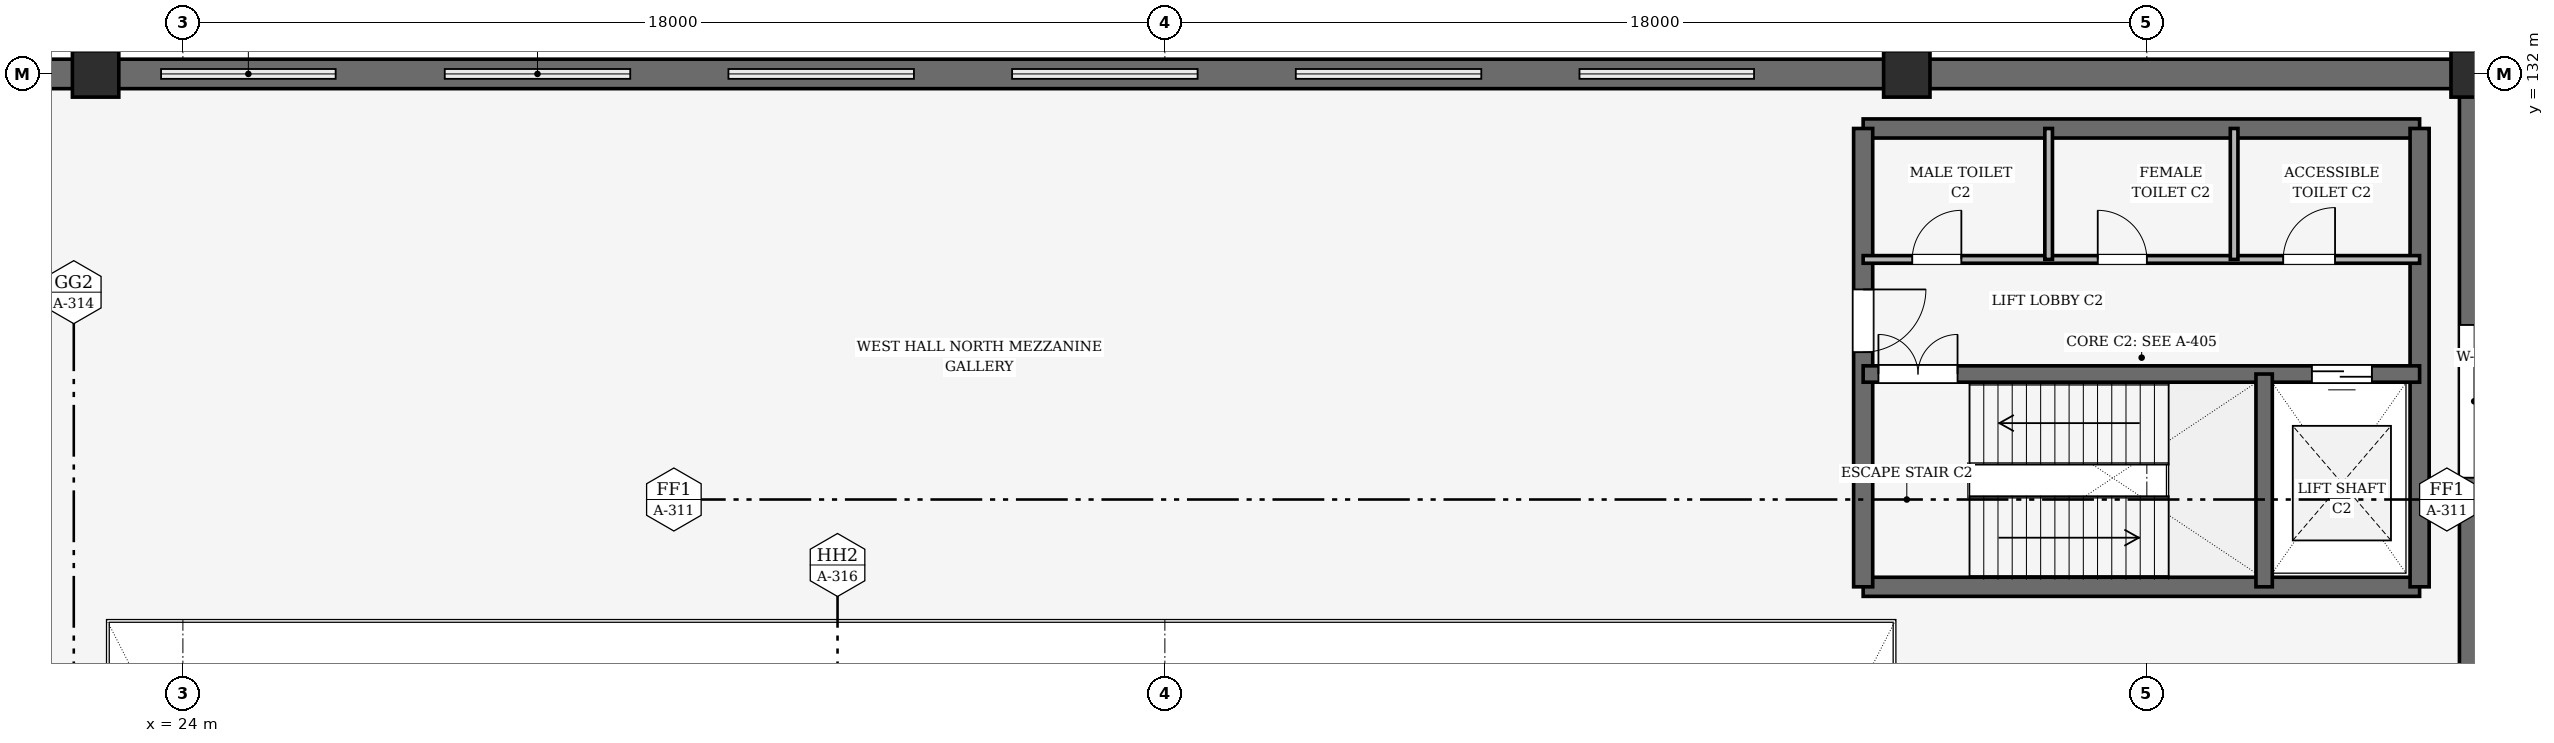
"""IFC4 building model, lengths in metres.
Left out: names, types, materials, properties, quantities, classifications, styles, units other than length and angle.
Written with IfcOpenShell. Run it as: python <this file> out.ifc"""

import sys

from ifc_helpers import new_model, si_unit, direction, frame, frame_2d, origin, origin_2d, place, context, subcontext, project, spatial, rectangle, extrude, element, fill, save


model = new_model("IFC4")
c1 = context("Model", 3, precision=1e-05, world=origin(), true_north=direction((0.0, 1.0)))
c2 = subcontext(c1, "Body", "Model", "MODEL_VIEW")
j1 = project(units=[si_unit("LENGTHUNIT", "METRE"), si_unit("PLANEANGLEUNIT", "RADIAN")], contexts=[c1])
p1 = place(None, origin())
s1 = spatial("IfcSite", under=j1, at=p1, CompositionType="ELEMENT")
p2 = place(p1, origin())
s2 = spatial("IfcBuilding", under=s1, at=p2, CompositionType="ELEMENT")
p3 = place(p2, frame((0.0, 0.0, 5.4)))
s3 = spatial("IfcBuildingStorey", under=s2, at=p3, CompositionType="ELEMENT", Elevation=5.4)
for number, where, z_axis, x_axis in (
    (1, (66.0, 132.0, 0.0), (0.0, 0.0, 1.0), (1.0, 0.0, 0.0)),
    (2, (22.4, 132.0, 0.0), (0.0, 0.0, 1.0), (1.0, 0.0, 0.0)),
    (3, (55.6, 132.0, 0.0), (0.0, 0.0, 1.0), (1.0, 0.0, 0.0)),
):
    element("IfcColumn", number, at=place(p3, frame(where, z_axis=z_axis, x_axis=x_axis)), inside=s3, PredefinedType="COLUMN", context=c2, shape_type="SweptSolid", body=[
        extrude(rectangle(XDim=0.85, YDim=0.85, at=origin_2d()), origin(), (0.0, 0.0, 1.0), 5.4),
    ])
p4 = place(p3, frame((66.0, 120.0, 0.0), z_axis=(0.0, 0.0, 1.0), x_axis=(0.0, 1.0, 0.0)))
e4 = element("IfcWall", 4, at=p4, inside=s3, PredefinedType="SOLIDWALL", context=c2, shape_type="SweptSolid", body=[
    extrude(rectangle(XDim=12.0, YDim=0.54, at=frame_2d((6.0, 0.0))), origin(), (0.0, 0.0, 1.0), 4.0),
])
p5 = place(p4, frame((4.6, 0.0, 1.3)))
e5 = element("IfcOpeningElement", 5, at=p5, cuts=e4, PredefinedType="OPENING", context=c2, shape_type="SweptSolid", body=[
    extrude(rectangle(XDim=2.8, YDim=1.35, at=frame_2d((1.4, 0.675))), frame((0.0, 0.28, 0.0), z_axis=(0.0, -1.0, 0.0), x_axis=(1.0, 0.0, 0.0)), (0.0, 0.0, 1.0), 0.56),
])
p6 = place(p3, frame((22.4, 132.0, 0.0), z_axis=(0.0, 0.0, 1.0), x_axis=(-1.0, 0.0, 0.0)))
e6 = element("IfcWall", 6, at=p6, inside=s3, PredefinedType="SOLIDWALL", context=c2, shape_type="SweptSolid", body=[
    extrude(rectangle(XDim=10.4, YDim=0.54, at=frame_2d((5.2, 0.0))), origin(), (0.0, 0.0, 1.0), 4.0),
])
p7 = place(p3, frame((55.6, 132.0, 0.0), z_axis=(0.0, 0.0, 1.0), x_axis=(-1.0, 0.0, 0.0)))
e7 = element("IfcWall", 7, at=p7, inside=s3, PredefinedType="SOLIDWALL", context=c2, shape_type="SweptSolid", body=[
    extrude(rectangle(XDim=33.2, YDim=0.54, at=frame_2d((16.6, 0.0))), origin(), (0.0, 0.0, 1.0), 0.5),
])
p8 = place(p3, frame((66.0, 132.0, 0.0), z_axis=(0.0, 0.0, 1.0), x_axis=(-1.0, 0.0, 0.0)))
e8 = element("IfcWall", 8, at=p8, inside=s3, PredefinedType="SOLIDWALL", context=c2, shape_type="SweptSolid", body=[
    extrude(rectangle(XDim=10.4, YDim=0.54, at=frame_2d((5.2, 0.0))), origin(), (0.0, 0.0, 1.0), 4.0),
])
for number, where, z_axis, x_axis in (
    (9, (54.8, 122.6, 0.0), (0.0, 0.0, 1.0), (1.0, 0.0, 0.0)),
    (10, (65.0, 131.0, 0.0), (0.0, 0.0, 1.0), (-1.0, 0.0, 0.0)),
):
    element("IfcWall", number, at=place(p3, frame(where, z_axis=z_axis, x_axis=x_axis)), inside=s3, PredefinedType="SHEAR", context=c2, shape_type="SweptSolid", body=[
        extrude(rectangle(XDim=10.2, YDim=0.35, at=frame_2d((5.1, 0.0))), origin(), (0.0, 0.0, 1.0), 5.4),
    ])
p9 = place(p3, frame((54.8, 131.0, 0.0), z_axis=(0.0, 0.0, 1.0), x_axis=(0.0, -1.0, 0.0)))
e11 = element("IfcWall", 11, at=p9, inside=s3, PredefinedType="SHEAR", context=c2, shape_type="SweptSolid", body=[
    extrude(rectangle(XDim=8.4, YDim=0.35, at=frame_2d((4.2, 0.0))), origin(), (0.0, 0.0, 1.0), 5.4),
])
p10 = place(p9, frame((2.95, 0.0, 0.0)))
e12 = element("IfcOpeningElement", 12, at=p10, cuts=e11, PredefinedType="OPENING", context=c2, shape_type="SweptSolid", body=[
    extrude(rectangle(XDim=1.15, YDim=2.15, at=frame_2d((0.575, 1.075))), frame((0.0, 0.185, 0.0), z_axis=(0.0, -1.0, 0.0), x_axis=(1.0, 0.0, 0.0)), (0.0, 0.0, 1.0), 0.37),
])
p11 = place(p3, frame((65.0, 122.6, 0.0), z_axis=(0.0, 0.0, 1.0), x_axis=(0.0, 1.0, 0.0)))
e13 = element("IfcWall", 13, at=p11, inside=s3, PredefinedType="SHEAR", context=c2, shape_type="SweptSolid", body=[
    extrude(rectangle(XDim=8.4, YDim=0.35, at=frame_2d((4.2, 0.0))), origin(), (0.0, 0.0, 1.0), 5.4),
])
p12 = place(p3, frame((54.8, 126.5, 0.0), z_axis=(0.0, 0.0, 1.0), x_axis=(1.0, 0.0, 0.0)))
e14 = element("IfcWall", 14, at=p12, inside=s3, PredefinedType="SHEAR", context=c2, shape_type="SweptSolid", body=[
    extrude(rectangle(XDim=10.2, YDim=0.3, at=frame_2d((5.1, 0.0))), origin(), (0.0, 0.0, 1.0), 5.4),
])
p13 = place(p12, frame((0.28, 0.0, 0.0)))
e15 = element("IfcOpeningElement", 15, at=p13, cuts=e14, PredefinedType="OPENING", context=c2, shape_type="SweptSolid", body=[
    extrude(rectangle(XDim=1.45, YDim=2.15, at=frame_2d((0.725, 1.075))), frame((0.0, 0.16, 0.0), z_axis=(0.0, -1.0, 0.0), x_axis=(1.0, 0.0, 0.0)), (0.0, 0.0, 1.0), 0.32),
])
p14 = place(p12, frame((8.225, 0.0, 0.0)))
e16 = element("IfcOpeningElement", 16, at=p14, cuts=e14, PredefinedType="OPENING", context=c2, shape_type="SweptSolid", body=[
    extrude(rectangle(XDim=1.1, YDim=2.15, at=frame_2d((0.55, 1.075))), frame((0.0, 0.16, 0.0), z_axis=(0.0, -1.0, 0.0), x_axis=(1.0, 0.0, 0.0)), (0.0, 0.0, 1.0), 0.32),
])
p15 = place(p3, frame((62.15, 122.6, 0.0), z_axis=(0.0, 0.0, 1.0), x_axis=(0.0, 1.0, 0.0)))
e17 = element("IfcWall", 17, at=p15, inside=s3, PredefinedType="SHEAR", context=c2, shape_type="SweptSolid", body=[
    extrude(rectangle(XDim=3.9, YDim=0.3, at=frame_2d((1.95, 0.0))), origin(), (0.0, 0.0, 1.0), 5.4),
])
p16 = place(p3, frame((54.8, 128.6, 0.0), z_axis=(0.0, 0.0, 1.0), x_axis=(1.0, 0.0, 0.0)))
e18 = element("IfcWall", 18, at=p16, inside=s3, PredefinedType="PARTITIONING", context=c2, shape_type="SweptSolid", body=[
    extrude(rectangle(XDim=10.2, YDim=0.14, at=frame_2d((5.1, 0.0))), origin(), (0.0, 0.0, 1.0), 4.035),
])
p17 = place(p16, frame((0.9, 0.0, 0.0)))
e19 = element("IfcOpeningElement", 19, at=p17, cuts=e18, PredefinedType="OPENING", context=c2, shape_type="SweptSolid", body=[
    extrude(rectangle(XDim=0.9, YDim=2.1, at=frame_2d((0.45, 1.05))), frame((0.0, 0.08, 0.0), z_axis=(0.0, -1.0, 0.0), x_axis=(1.0, 0.0, 0.0)), (0.0, 0.0, 1.0), 0.16),
])
p18 = place(p16, frame((4.3, 0.0, 0.0)))
e20 = element("IfcOpeningElement", 20, at=p18, cuts=e18, PredefinedType="OPENING", context=c2, shape_type="SweptSolid", body=[
    extrude(rectangle(XDim=0.9, YDim=2.1, at=frame_2d((0.45, 1.05))), frame((0.0, 0.08, 0.0), z_axis=(0.0, -1.0, 0.0), x_axis=(1.0, 0.0, 0.0)), (0.0, 0.0, 1.0), 0.16),
])
p19 = place(p16, frame((7.7, 0.0, 0.0)))
e21 = element("IfcOpeningElement", 21, at=p19, cuts=e18, PredefinedType="OPENING", context=c2, shape_type="SweptSolid", body=[
    extrude(rectangle(XDim=0.95, YDim=2.1, at=frame_2d((0.475, 1.05))), frame((0.0, 0.08, 0.0), z_axis=(0.0, -1.0, 0.0), x_axis=(1.0, 0.0, 0.0)), (0.0, 0.0, 1.0), 0.16),
])
for number, where, z_axis, x_axis in (
    (22, (58.2, 128.6, 0.0), (0.0, 0.0, 1.0), (0.0, 1.0, 0.0)),
    (23, (61.6, 128.6, 0.0), (0.0, 0.0, 1.0), (0.0, 1.0, 0.0)),
):
    element("IfcWall", number, at=place(p3, frame(where, z_axis=z_axis, x_axis=x_axis)), inside=s3, PredefinedType="PARTITIONING", context=c2, shape_type="SweptSolid", body=[
        extrude(rectangle(XDim=2.4, YDim=0.14, at=frame_2d((1.2, 0.0))), origin(), (0.0, 0.0, 1.0), 4.5),
    ])
p20 = place(p5, origin())
e24 = element("IfcWindow", 24, at=p20, inside=s3, PartitioningType="TRIPLE_PANEL_HORIZONTAL", PredefinedType="WINDOW", context=c2, shape_type="SweptSolid", body=[
    extrude(rectangle(XDim=2.8, YDim=1.35, at=frame_2d((1.4, 0.675))), frame((0.0, 0.03, 0.0), z_axis=(0.0, -1.0, 0.0), x_axis=(1.0, 0.0, 0.0)), (0.0, 0.0, 1.0), 0.06),
])
fill(e5, e24)
p21 = place(p10, origin())
e25 = element("IfcDoor", 25, at=p21, inside=s3, OperationType="SINGLE_SWING_LEFT", PredefinedType="DOOR", context=c2, shape_type="SweptSolid", body=[
    extrude(rectangle(XDim=1.15, YDim=2.15, at=frame_2d((0.575, 1.075))), frame((0.0, 0.025, 0.0), z_axis=(0.0, -1.0, 0.0), x_axis=(1.0, 0.0, 0.0)), (0.0, 0.0, 1.0), 0.05),
])
fill(e12, e25)
p22 = place(p13, origin())
e26 = element("IfcDoor", 26, at=p22, inside=s3, OperationType="DOUBLE_DOOR_SINGLE_SWING", PredefinedType="DOOR", context=c2, shape_type="SweptSolid", body=[
    extrude(rectangle(XDim=1.45, YDim=2.15, at=frame_2d((0.725, 1.075))), frame((0.0, 0.025, 0.0), z_axis=(0.0, -1.0, 0.0), x_axis=(1.0, 0.0, 0.0)), (0.0, 0.0, 1.0), 0.05),
])
fill(e15, e26)
p23 = place(p14, origin())
e27 = element("IfcDoor", 27, at=p23, inside=s3, OperationType="DOUBLE_DOOR_SLIDING", PredefinedType="DOOR", context=c2, shape_type="SweptSolid", body=[
    extrude(rectangle(XDim=1.1, YDim=2.15, at=frame_2d((0.55, 1.075))), frame((0.0, 0.025, 0.0), z_axis=(0.0, -1.0, 0.0), x_axis=(1.0, 0.0, 0.0)), (0.0, 0.0, 1.0), 0.05),
])
fill(e16, e27)
p24 = place(p17, origin())
e28 = element("IfcDoor", 28, at=p24, inside=s3, OperationType="SINGLE_SWING_RIGHT", PredefinedType="DOOR", context=c2, shape_type="SweptSolid", body=[
    extrude(rectangle(XDim=0.9, YDim=2.1, at=frame_2d((0.45, 1.05))), frame((0.0, 0.025, 0.0), z_axis=(0.0, -1.0, 0.0), x_axis=(1.0, 0.0, 0.0)), (0.0, 0.0, 1.0), 0.05),
])
fill(e19, e28)
p25 = place(p18, origin())
e29 = element("IfcDoor", 29, at=p25, inside=s3, OperationType="SINGLE_SWING_LEFT", PredefinedType="DOOR", context=c2, shape_type="SweptSolid", body=[
    extrude(rectangle(XDim=0.9, YDim=2.1, at=frame_2d((0.45, 1.05))), frame((0.0, 0.025, 0.0), z_axis=(0.0, -1.0, 0.0), x_axis=(1.0, 0.0, 0.0)), (0.0, 0.0, 1.0), 0.05),
])
fill(e20, e29)
p26 = place(p19, origin())
e30 = element("IfcDoor", 30, at=p26, inside=s3, OperationType="SINGLE_SWING_RIGHT", PredefinedType="DOOR", context=c2, shape_type="SweptSolid", body=[
    extrude(rectangle(XDim=0.95, YDim=2.1, at=frame_2d((0.475, 1.05))), frame((0.0, 0.025, 0.0), z_axis=(0.0, -1.0, 0.0), x_axis=(1.0, 0.0, 0.0)), (0.0, 0.0, 1.0), 0.05),
])
fill(e21, e30)
save(model, sys.argv[1])
